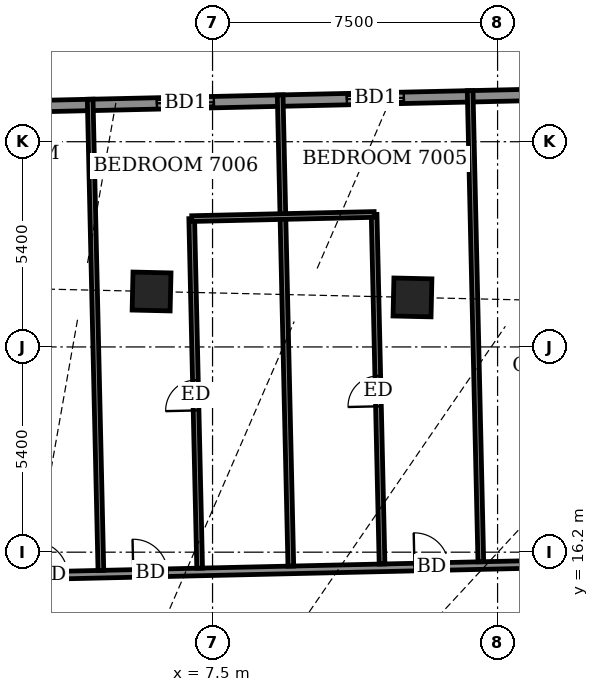
"""IFC4 building model, lengths in metres.
Left out: names, types, materials, properties, quantities, classifications, styles, units other than length and angle.
Written with IfcOpenShell. Run it as: python <this file> out.ifc"""

import sys

from ifc_helpers import new_model, si_unit, direction, frame, frame_2d, origin, origin_2d, place, context, subcontext, project, spatial, rectangle, extrude, element, fill, save


model = new_model("IFC4")
c1 = context("Model", 3, precision=1e-05, world=origin(), true_north=direction((0.0, 1.0)))
c2 = subcontext(c1, "Body", "Model", "MODEL_VIEW")
j1 = project(units=[si_unit("LENGTHUNIT", "METRE"), si_unit("PLANEANGLEUNIT", "RADIAN")], contexts=[c1])
p1 = place(None, origin())
s1 = spatial("IfcSite", under=j1, at=p1, CompositionType="ELEMENT")
p2 = place(p1, origin())
s2 = spatial("IfcBuilding", under=s1, at=p2, CompositionType="ELEMENT")
p3 = place(p2, frame((0.0, 0.0, 275.3)))
s3 = spatial("IfcBuildingStorey", under=s2, at=p3, CompositionType="ELEMENT", Elevation=275.3)
for number, where, z_axis, x_axis in (
    (1, (12.761, 22.903, -0.55), (0.0, 0.0, 1.0), (-1.0, 0.023, 0.0)),
    (2, (5.896, 23.059, -0.55), (0.0, 0.0, 1.0), (-1.0, 0.023, 0.0)),
):
    element("IfcColumn", number, at=place(p3, frame(where, z_axis=z_axis, x_axis=x_axis)), inside=s3, PredefinedType="COLUMN", context=c2, shape_type="SweptSolid", body=[
        extrude(rectangle(XDim=1.0, YDim=1.0, at=origin_2d()), origin(), (0.0, 0.0, 1.0), 4.6),
    ])
p4 = place(p3, frame((26.216, 28.465, 0.0), z_axis=(0.0, 0.0, 1.0), x_axis=(-0.999742843677, -0.022677004157, 0.0)))
e3 = element("IfcWall", 3, at=p4, inside=s3, PredefinedType="SOLIDWALL", context=c2, shape_type="SweptSolid", body=[
    extrude(rectangle(XDim=49.836, YDim=0.3, at=frame_2d((24.918, 0.0))), origin(), (0.0, 0.0, 1.0), 2.45),
])
p5 = place(p4, frame((0.618, 0.0, 0.0)))
e4 = element("IfcOpeningElement", 4, at=p5, cuts=e3, PredefinedType="OPENING", context=c2, shape_type="SweptSolid", body=[
    extrude(rectangle(XDim=1.5, YDim=2.4, at=frame_2d((0.75, 1.2))), frame((0.0, 0.16, 0.0), z_axis=(0.0, -1.0, 0.0), x_axis=(1.0, 0.0, 0.0)), (0.0, 0.0, 1.0), 0.32),
])
p6 = place(p4, frame((3.811, 0.0, 0.9)))
e5 = element("IfcOpeningElement", 5, at=p6, cuts=e3, PredefinedType="OPENING", context=c2, shape_type="SweptSolid", body=[
    extrude(rectangle(XDim=1.2, YDim=1.5, at=frame_2d((0.6, 0.75))), frame((0.0, 0.16, 0.0), z_axis=(0.0, -1.0, 0.0), x_axis=(1.0, 0.0, 0.0)), (0.0, 0.0, 1.0), 0.32),
])
p7 = place(p4, frame((7.736, 0.0, 0.9)))
e6 = element("IfcOpeningElement", 6, at=p7, cuts=e3, PredefinedType="OPENING", context=c2, shape_type="SweptSolid", body=[
    extrude(rectangle(XDim=2.4, YDim=1.5, at=frame_2d((1.2, 0.75))), frame((0.0, 0.16, 0.0), z_axis=(0.0, -1.0, 0.0), x_axis=(1.0, 0.0, 0.0)), (0.0, 0.0, 1.0), 0.32),
])
p8 = place(p4, frame((13.686, 0.0, 0.0)))
e7 = element("IfcOpeningElement", 7, at=p8, cuts=e3, PredefinedType="OPENING", context=c2, shape_type="SweptSolid", body=[
    extrude(rectangle(XDim=1.5, YDim=2.4, at=frame_2d((0.75, 1.2))), frame((0.0, 0.16, 0.0), z_axis=(0.0, -1.0, 0.0), x_axis=(1.0, 0.0, 0.0)), (0.0, 0.0, 1.0), 0.32),
])
p9 = place(p4, frame((18.686, 0.0, 0.0)))
e8 = element("IfcOpeningElement", 8, at=p9, cuts=e3, PredefinedType="OPENING", context=c2, shape_type="SweptSolid", body=[
    extrude(rectangle(XDim=1.5, YDim=2.4, at=frame_2d((0.75, 1.2))), frame((0.0, 0.16, 0.0), z_axis=(0.0, -1.0, 0.0), x_axis=(1.0, 0.0, 0.0)), (0.0, 0.0, 1.0), 0.32),
])
p10 = place(p4, frame((23.711, 0.0, 0.0)))
e9 = element("IfcOpeningElement", 9, at=p10, cuts=e3, PredefinedType="OPENING", context=c2, shape_type="SweptSolid", body=[
    extrude(rectangle(XDim=1.5, YDim=2.4, at=frame_2d((0.75, 1.2))), frame((0.0, 0.16, 0.0), z_axis=(0.0, -1.0, 0.0), x_axis=(1.0, 0.0, 0.0)), (0.0, 0.0, 1.0), 0.32),
])
p11 = place(p4, frame((30.486, 0.0, 0.0)))
e10 = element("IfcOpeningElement", 10, at=p11, cuts=e3, PredefinedType="OPENING", context=c2, shape_type="SweptSolid", body=[
    extrude(rectangle(XDim=1.5, YDim=2.4, at=frame_2d((0.75, 1.2))), frame((0.0, 0.16, 0.0), z_axis=(0.0, -1.0, 0.0), x_axis=(1.0, 0.0, 0.0)), (0.0, 0.0, 1.0), 0.32),
])
p12 = place(p4, frame((37.286, 0.0, 0.9)))
e11 = element("IfcOpeningElement", 11, at=p12, cuts=e3, PredefinedType="OPENING", context=c2, shape_type="SweptSolid", body=[
    extrude(rectangle(XDim=2.4, YDim=1.5, at=frame_2d((1.2, 0.75))), frame((0.0, 0.16, 0.0), z_axis=(0.0, -1.0, 0.0), x_axis=(1.0, 0.0, 0.0)), (0.0, 0.0, 1.0), 0.32),
])
p13 = place(p4, frame((44.536, 0.0, 0.9)))
e12 = element("IfcOpeningElement", 12, at=p13, cuts=e3, PredefinedType="OPENING", context=c2, shape_type="SweptSolid", body=[
    extrude(rectangle(XDim=2.4, YDim=1.5, at=frame_2d((1.2, 0.75))), frame((0.0, 0.16, 0.0), z_axis=(0.0, -1.0, 0.0), x_axis=(1.0, 0.0, 0.0)), (0.0, 0.0, 1.0), 0.32),
])
p14 = place(p3, frame((-24.566, 14.96, 0.0), z_axis=(0.0, 0.0, 1.0), x_axis=(0.999742854064, 0.022676546211, 0.0)))
e13 = element("IfcWall", 13, at=p14, inside=s3, PredefinedType="PARTITIONING", context=c2, shape_type="SweptSolid", body=[
    extrude(rectangle(XDim=54.025, YDim=0.2, at=frame_2d((27.012, 0.0))), origin(), (0.0, 0.0, 1.0), 2.35),
])
p15 = place(p14, frame((51.031, 0.0, 0.0)))
e14 = element("IfcOpeningElement", 14, at=p15, cuts=e13, PredefinedType="OPENING", context=c2, shape_type="SweptSolid", body=[
    extrude(rectangle(XDim=1.0, YDim=2.1, at=frame_2d((0.5, 1.05))), frame((0.0, 0.11, 0.0), z_axis=(0.0, -1.0, 0.0), x_axis=(1.0, 0.0, 0.0)), (0.0, 0.0, 1.0), 0.22),
])
p16 = place(p14, frame((46.164, 0.0, 0.0)))
e15 = element("IfcOpeningElement", 15, at=p16, cuts=e13, PredefinedType="OPENING", context=c2, shape_type="SweptSolid", body=[
    extrude(rectangle(XDim=1.0, YDim=2.1, at=frame_2d((0.5, 1.05))), frame((0.0, 0.11, 0.0), z_axis=(0.0, -1.0, 0.0), x_axis=(1.0, 0.0, 0.0)), (0.0, 0.0, 1.0), 0.22),
])
p17 = place(p14, frame((41.639, 0.0, 0.0)))
e16 = element("IfcOpeningElement", 16, at=p17, cuts=e13, PredefinedType="OPENING", context=c2, shape_type="SweptSolid", body=[
    extrude(rectangle(XDim=1.0, YDim=2.1, at=frame_2d((0.5, 1.05))), frame((0.0, 0.11, 0.0), z_axis=(0.0, -1.0, 0.0), x_axis=(1.0, 0.0, 0.0)), (0.0, 0.0, 1.0), 0.22),
])
p18 = place(p14, frame((37.389, 0.0, 0.0)))
e17 = element("IfcOpeningElement", 17, at=p18, cuts=e13, PredefinedType="OPENING", context=c2, shape_type="SweptSolid", body=[
    extrude(rectangle(XDim=0.9, YDim=2.1, at=frame_2d((0.45, 1.05))), frame((0.0, 0.11, 0.0), z_axis=(0.0, -1.0, 0.0), x_axis=(1.0, 0.0, 0.0)), (0.0, 0.0, 1.0), 0.22),
])
p19 = place(p14, frame((29.989, 0.0, 0.0)))
e18 = element("IfcOpeningElement", 18, at=p19, cuts=e13, PredefinedType="OPENING", context=c2, shape_type="SweptSolid", body=[
    extrude(rectangle(XDim=0.9, YDim=2.1, at=frame_2d((0.45, 1.05))), frame((0.0, 0.11, 0.0), z_axis=(0.0, -1.0, 0.0), x_axis=(1.0, 0.0, 0.0)), (0.0, 0.0, 1.0), 0.22),
])
p20 = place(p14, frame((27.364, 0.0, 0.0)))
e19 = element("IfcOpeningElement", 19, at=p20, cuts=e13, PredefinedType="OPENING", context=c2, shape_type="SweptSolid", body=[
    extrude(rectangle(XDim=0.9, YDim=2.1, at=frame_2d((0.45, 1.05))), frame((0.0, 0.11, 0.0), z_axis=(0.0, -1.0, 0.0), x_axis=(1.0, 0.0, 0.0)), (0.0, 0.0, 1.0), 0.22),
])
p21 = place(p14, frame((18.139, 0.0, 0.0)))
e20 = element("IfcOpeningElement", 20, at=p21, cuts=e13, PredefinedType="OPENING", context=c2, shape_type="SweptSolid", body=[
    extrude(rectangle(XDim=1.0, YDim=2.1, at=frame_2d((0.5, 1.05))), frame((0.0, 0.11, 0.0), z_axis=(0.0, -1.0, 0.0), x_axis=(1.0, 0.0, 0.0)), (0.0, 0.0, 1.0), 0.22),
])
p22 = place(p14, frame((22.439, 0.0, 0.0)))
e21 = element("IfcOpeningElement", 21, at=p22, cuts=e13, PredefinedType="OPENING", context=c2, shape_type="SweptSolid", body=[
    extrude(rectangle(XDim=0.9, YDim=2.1, at=frame_2d((0.45, 1.05))), frame((0.0, 0.11, 0.0), z_axis=(0.0, -1.0, 0.0), x_axis=(1.0, 0.0, 0.0)), (0.0, 0.0, 1.0), 0.22),
])
p23 = place(p14, frame((12.089, 0.0, 0.0)))
e22 = element("IfcOpeningElement", 22, at=p23, cuts=e13, PredefinedType="OPENING", context=c2, shape_type="SweptSolid", body=[
    extrude(rectangle(XDim=1.0, YDim=2.1, at=frame_2d((0.5, 1.05))), frame((0.0, 0.11, 0.0), z_axis=(0.0, -1.0, 0.0), x_axis=(1.0, 0.0, 0.0)), (0.0, 0.0, 1.0), 0.22),
])
p24 = place(p14, frame((2.918, 0.0, 0.0)))
e23 = element("IfcOpeningElement", 23, at=p24, cuts=e13, PredefinedType="OPENING", context=c2, shape_type="SweptSolid", body=[
    extrude(rectangle(XDim=1.0, YDim=2.1, at=frame_2d((0.5, 1.05))), frame((0.0, 0.11, 0.0), z_axis=(0.0, -1.0, 0.0), x_axis=(1.0, 0.0, 0.0)), (0.0, 0.0, 1.0), 0.22),
])
p25 = place(p3, frame((4.562, 15.721, 0.0), z_axis=(0.0, 0.0, 1.0), x_axis=(-0.022740189192, 0.999741408463, 0.0)))
e24 = element("IfcWall", 24, at=p25, inside=s3, PredefinedType="PARTITIONING", context=c2, shape_type="SweptSolid", body=[
    extrude(rectangle(XDim=12.4, YDim=0.15, at=frame_2d((6.2, 0.0))), origin(), (0.0, 0.0, 1.0), 2.35),
])
p26 = place(p3, frame((7.161, 15.78, 0.0), z_axis=(0.0, 0.0, 1.0), x_axis=(-0.022717185456, 0.999741931443, 0.0)))
e25 = element("IfcWall", 25, at=p26, inside=s3, PredefinedType="PARTITIONING", context=c2, shape_type="SweptSolid", body=[
    extrude(rectangle(XDim=9.199, YDim=0.15, at=frame_2d((4.6, 0.0))), origin(), (0.0, 0.0, 1.0), 2.35),
])
p27 = place(p26, frame((4.15, 0.0, 0.0)))
e26 = element("IfcOpeningElement", 26, at=p27, cuts=e25, PredefinedType="OPENING", context=c2, shape_type="SweptSolid", body=[
    extrude(rectangle(XDim=0.8, YDim=2.1, at=frame_2d((0.4, 1.05))), frame((0.0, 0.085, 0.0), z_axis=(0.0, -1.0, 0.0), x_axis=(1.0, 0.0, 0.0)), (0.0, 0.0, 1.0), 0.17),
])
p28 = place(p3, frame((9.56, 15.834, 0.0), z_axis=(0.0, 0.0, 1.0), x_axis=(-0.022661475803, 0.999743195783, 0.0)))
e27 = element("IfcWall", 27, at=p28, inside=s3, PredefinedType="PARTITIONING", context=c2, shape_type="SweptSolid", body=[
    extrude(rectangle(XDim=12.4, YDim=0.15, at=frame_2d((6.2, 0.0))), origin(), (0.0, 0.0, 1.0), 2.35),
])
p29 = place(p3, frame((11.96, 15.889, 0.0), z_axis=(0.0, 0.0, 1.0), x_axis=(-0.022717185456, 0.999741931443, 0.0)))
e28 = element("IfcWall", 28, at=p29, inside=s3, PredefinedType="PARTITIONING", context=c2, shape_type="SweptSolid", body=[
    extrude(rectangle(XDim=9.199, YDim=0.15, at=frame_2d((4.6, 0.0))), origin(), (0.0, 0.0, 1.0), 2.35),
])
p30 = place(p29, frame((4.15, 0.0, 0.0)))
e29 = element("IfcOpeningElement", 29, at=p30, cuts=e28, PredefinedType="OPENING", context=c2, shape_type="SweptSolid", body=[
    extrude(rectangle(XDim=0.8, YDim=2.1, at=frame_2d((0.4, 1.05))), frame((0.0, 0.085, 0.0), z_axis=(0.0, -1.0, 0.0), x_axis=(1.0, 0.0, 0.0)), (0.0, 0.0, 1.0), 0.17),
])
p31 = place(p3, frame((14.559, 15.948, 0.0), z_axis=(0.0, 0.0, 1.0), x_axis=(-0.022663260168, 0.999743155335, 0.0)))
e30 = element("IfcWall", 30, at=p31, inside=s3, PredefinedType="PARTITIONING", context=c2, shape_type="SweptSolid", body=[
    extrude(rectangle(XDim=12.399, YDim=0.15, at=frame_2d((6.2, 0.0))), origin(), (0.0, 0.0, 1.0), 2.35),
])
p32 = place(p3, frame((6.954, 24.977, 0.0), z_axis=(0.0, 0.0, 1.0), x_axis=(0.999742675121, 0.022684433919, 0.0)))
e31 = element("IfcWall", 31, at=p32, inside=s3, PredefinedType="PARTITIONING", context=c2, shape_type="SweptSolid", body=[
    extrude(rectangle(XDim=4.8, YDim=0.15, at=frame_2d((2.4, 0.0))), origin(), (0.0, 0.0, 1.0), 2.85),
])
p33 = place(p8, origin())
e32 = element("IfcDoor", 32, at=p33, inside=s3, OperationType="SLIDING_TO_LEFT", PredefinedType="DOOR", context=c2, shape_type="SweptSolid", body=[
    extrude(rectangle(XDim=1.5, YDim=2.4, at=frame_2d((0.75, 1.2))), frame((0.0, 0.025, 0.0), z_axis=(0.0, -1.0, 0.0), x_axis=(1.0, 0.0, 0.0)), (0.0, 0.0, 1.0), 0.05),
])
fill(e7, e32)
p34 = place(p9, origin())
e33 = element("IfcDoor", 33, at=p34, inside=s3, OperationType="SLIDING_TO_LEFT", PredefinedType="DOOR", context=c2, shape_type="SweptSolid", body=[
    extrude(rectangle(XDim=1.5, YDim=2.4, at=frame_2d((0.75, 1.2))), frame((0.0, 0.025, 0.0), z_axis=(0.0, -1.0, 0.0), x_axis=(1.0, 0.0, 0.0)), (0.0, 0.0, 1.0), 0.05),
])
fill(e8, e33)
p35 = place(p18, origin())
e34 = element("IfcDoor", 34, at=p35, inside=s3, OperationType="SINGLE_SWING_LEFT", PredefinedType="DOOR", context=c2, shape_type="SweptSolid", body=[
    extrude(rectangle(XDim=0.9, YDim=2.1, at=frame_2d((0.45, 1.05))), frame((0.0, 0.025, 0.0), z_axis=(0.0, -1.0, 0.0), x_axis=(1.0, 0.0, 0.0)), (0.0, 0.0, 1.0), 0.05),
])
fill(e17, e34)
p36 = place(p30, origin())
e35 = element("IfcDoor", 35, at=p36, inside=s3, OperationType="SINGLE_SWING_LEFT", PredefinedType="DOOR", context=c2, shape_type="SweptSolid", body=[
    extrude(rectangle(XDim=0.8, YDim=2.1, at=frame_2d((0.4, 1.05))), frame((0.0, 0.025, 0.0), z_axis=(0.0, -1.0, 0.0), x_axis=(1.0, 0.0, 0.0)), (0.0, 0.0, 1.0), 0.05),
])
fill(e29, e35)
p37 = place(p19, origin())
e36 = element("IfcDoor", 36, at=p37, inside=s3, OperationType="SINGLE_SWING_RIGHT", PredefinedType="DOOR", context=c2, shape_type="SweptSolid", body=[
    extrude(rectangle(XDim=0.9, YDim=2.1, at=frame_2d((0.45, 1.05))), frame((0.0, 0.025, 0.0), z_axis=(0.0, -1.0, 0.0), x_axis=(1.0, 0.0, 0.0)), (0.0, 0.0, 1.0), 0.05),
])
fill(e18, e36)
p38 = place(p27, origin())
e37 = element("IfcDoor", 37, at=p38, inside=s3, OperationType="SINGLE_SWING_RIGHT", PredefinedType="DOOR", context=c2, shape_type="SweptSolid", body=[
    extrude(rectangle(XDim=0.8, YDim=2.1, at=frame_2d((0.4, 1.05))), frame((0.0, 0.025, 0.0), z_axis=(0.0, -1.0, 0.0), x_axis=(1.0, 0.0, 0.0)), (0.0, 0.0, 1.0), 0.05),
])
fill(e26, e37)
p39 = place(p20, origin())
e38 = element("IfcDoor", 38, at=p39, inside=s3, OperationType="SINGLE_SWING_LEFT", PredefinedType="DOOR", context=c2, shape_type="SweptSolid", body=[
    extrude(rectangle(XDim=0.9, YDim=2.1, at=frame_2d((0.45, 1.05))), frame((0.0, 0.025, 0.0), z_axis=(0.0, -1.0, 0.0), x_axis=(1.0, 0.0, 0.0)), (0.0, 0.0, 1.0), 0.05),
])
fill(e19, e38)
save(model, sys.argv[1])
